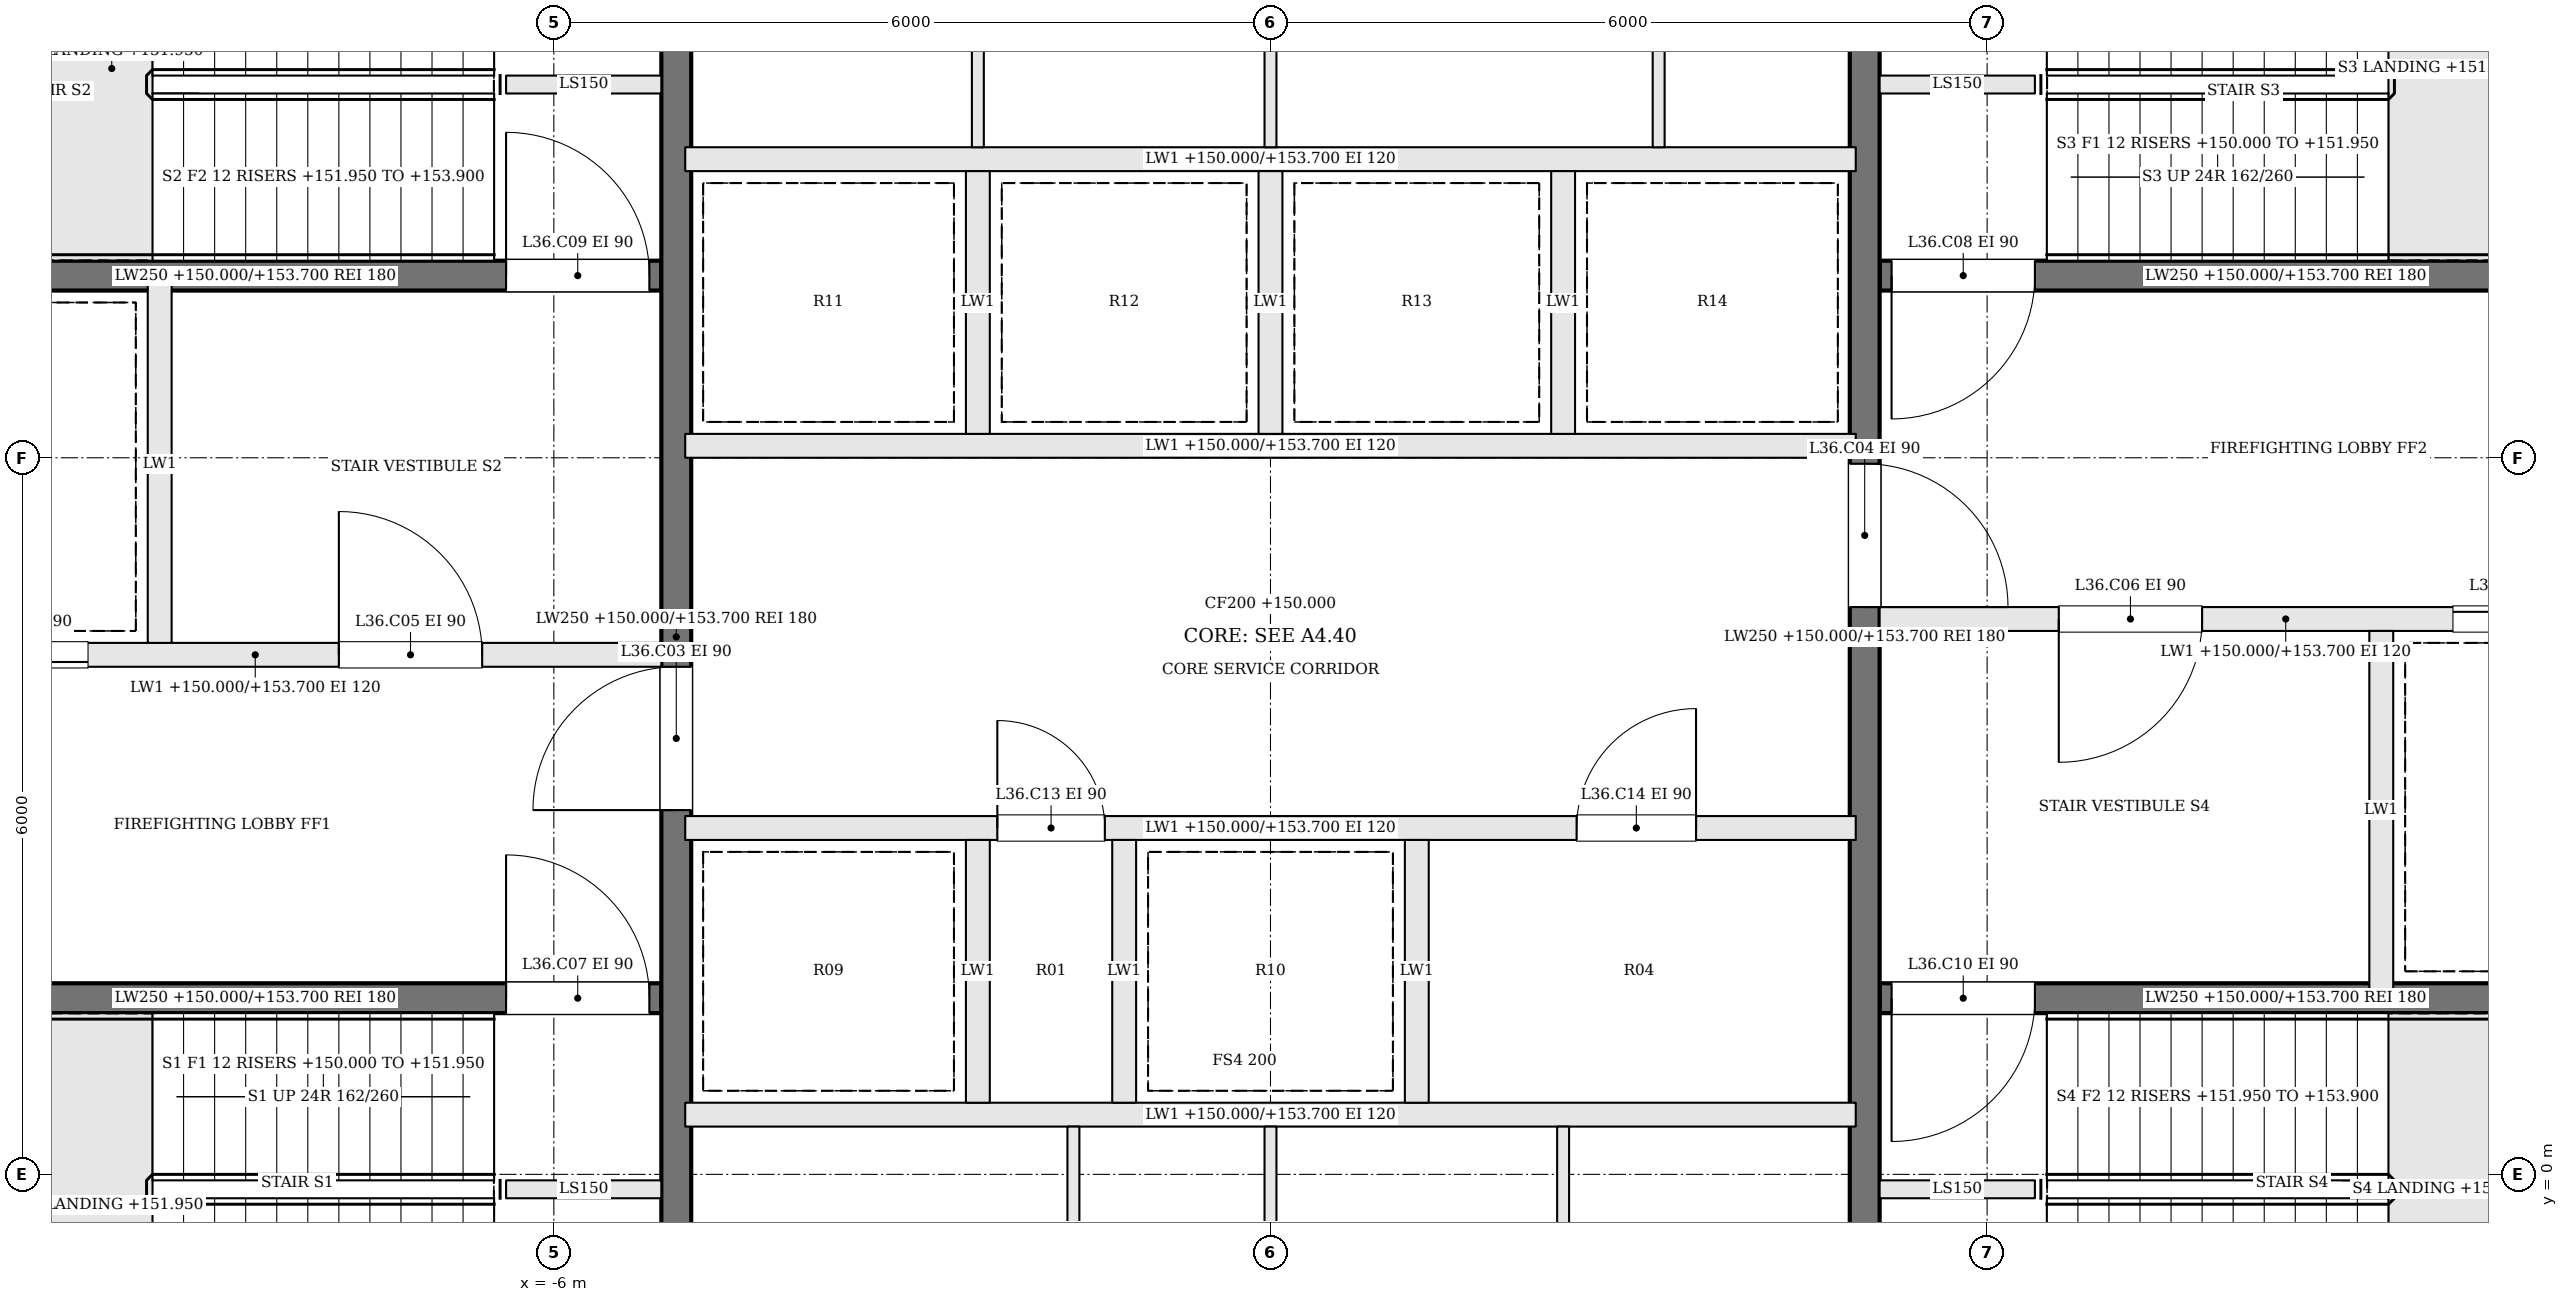
"""IFC4 building model, lengths in metres.
Left out: names, types, materials, properties, quantities, classifications, styles, units other than length and angle.
Written with IfcOpenShell. Run it as: python <this file> out.ifc"""

import sys

from ifc_helpers import new_model, si_unit, direction, frame, frame_2d, origin, place, context, subcontext, project, spatial, rectangle, extrude, element, fill, save


model = new_model("IFC4")
c1 = context("Model", 3, precision=1e-05, world=origin(), true_north=direction((0.0, 1.0)))
c2 = subcontext(c1, "Body", "Model", "MODEL_VIEW")
j1 = project(units=[si_unit("LENGTHUNIT", "METRE"), si_unit("PLANEANGLEUNIT", "RADIAN")], contexts=[c1])
p1 = place(None, origin())
s1 = spatial("IfcSite", under=j1, at=p1, CompositionType="ELEMENT")
p2 = place(p1, origin())
s2 = spatial("IfcBuilding", under=s1, at=p2, CompositionType="ELEMENT")
p3 = place(p2, frame((0.0, 0.0, 150.0)))
s3 = spatial("IfcBuildingStorey", under=s2, at=p3, CompositionType="ELEMENT", Elevation=150.0)
for number, where, z_axis, x_axis in (
    (1, (-6.4, -0.125, 0.0), (0.0, 0.0, 1.0), (1.0, 0.0, 0.0)),
    (2, (6.4, 9.125, 0.0), (0.0, 0.0, 1.0), (-1.0, 0.0, 0.0)),
    (3, (-6.4, 9.125, 0.0), (0.0, 0.0, 1.0), (1.0, 0.0, 0.0)),
    (4, (6.4, -0.125, 0.0), (0.0, 0.0, 1.0), (-1.0, 0.0, 0.0)),
):
    element("IfcWall", number, at=place(p3, frame(where, z_axis=z_axis, x_axis=x_axis)), inside=s3, PredefinedType="SOLIDWALL", context=c2, shape_type="SweptSolid", body=[
        extrude(rectangle(XDim=1.3, YDim=0.15, at=frame_2d((0.65, 0.0))), origin(), (0.0, 0.0, 1.0), 3.7),
    ])
p4 = place(p3, frame((-11.9, 1.475, 0.0), z_axis=(0.0, 0.0, 1.0), x_axis=(1.0, 0.0, 0.0)))
e5 = element("IfcWall", 5, at=p4, inside=s3, PredefinedType="SOLIDWALL", context=c2, shape_type="SweptSolid", body=[
    extrude(rectangle(XDim=6.8, YDim=0.25, at=frame_2d((3.4, 0.0))), origin(), (0.0, 0.0, 1.0), 3.7),
])
p5 = place(p4, frame((5.5, 0.0, 0.0)))
e6 = element("IfcOpeningElement", 6, at=p5, cuts=e5, PredefinedType="OPENING", context=c2, shape_type="SweptSolid", body=[
    extrude(rectangle(XDim=1.2, YDim=2.1, at=frame_2d((0.6, 1.05))), frame((0.0, 0.135, 0.0), z_axis=(0.0, -1.0, 0.0), x_axis=(1.0, 0.0, 0.0)), (0.0, 0.0, 1.0), 0.27),
])
p6 = place(p3, frame((11.9, 7.525, 0.0), z_axis=(0.0, 0.0, 1.0), x_axis=(-1.0, 0.0, 0.0)))
e7 = element("IfcWall", 7, at=p6, inside=s3, PredefinedType="SOLIDWALL", context=c2, shape_type="SweptSolid", body=[
    extrude(rectangle(XDim=6.8, YDim=0.25, at=frame_2d((3.4, 0.0))), origin(), (0.0, 0.0, 1.0), 3.7),
])
p7 = place(p6, frame((5.5, 0.0, 0.0)))
e8 = element("IfcOpeningElement", 8, at=p7, cuts=e7, PredefinedType="OPENING", context=c2, shape_type="SweptSolid", body=[
    extrude(rectangle(XDim=1.2, YDim=2.1, at=frame_2d((0.6, 1.05))), frame((0.0, 0.135, 0.0), z_axis=(0.0, -1.0, 0.0), x_axis=(1.0, 0.0, 0.0)), (0.0, 0.0, 1.0), 0.27),
])
p8 = place(p3, frame((-11.9, 4.35, 0.0), z_axis=(0.0, 0.0, 1.0), x_axis=(1.0, 0.0, 0.0)))
e9 = element("IfcWall", 9, at=p8, inside=s3, PredefinedType="SOLIDWALL", context=c2, shape_type="SweptSolid", body=[
    extrude(rectangle(XDim=6.8, YDim=0.2, at=frame_2d((3.4, 0.0))), origin(), (0.0, 0.0, 1.0), 3.7),
])
p9 = place(p8, frame((4.1, 0.0, 0.0)))
e10 = element("IfcOpeningElement", 10, at=p9, cuts=e9, PredefinedType="OPENING", context=c2, shape_type="SweptSolid", body=[
    extrude(rectangle(XDim=1.2, YDim=2.1, at=frame_2d((0.6, 1.05))), frame((0.0, 0.11, 0.0), z_axis=(0.0, -1.0, 0.0), x_axis=(1.0, 0.0, 0.0)), (0.0, 0.0, 1.0), 0.22),
])
p10 = place(p8, frame((0.8, 0.0, 0.0)))
e11 = element("IfcOpeningElement", 11, at=p10, cuts=e9, PredefinedType="OPENING", context=c2, shape_type="SweptSolid", body=[
    extrude(rectangle(XDim=1.2, YDim=2.1, at=frame_2d((0.6, 1.05))), frame((0.0, 0.11, 0.0), z_axis=(0.0, -1.0, 0.0), x_axis=(1.0, 0.0, 0.0)), (0.0, 0.0, 1.0), 0.22),
])
p11 = place(p3, frame((11.9, 4.65, 0.0), z_axis=(0.0, 0.0, 1.0), x_axis=(-1.0, 0.0, 0.0)))
e12 = element("IfcWall", 12, at=p11, inside=s3, PredefinedType="SOLIDWALL", context=c2, shape_type="SweptSolid", body=[
    extrude(rectangle(XDim=6.8, YDim=0.2, at=frame_2d((3.4, 0.0))), origin(), (0.0, 0.0, 1.0), 3.7),
])
p12 = place(p11, frame((4.1, 0.0, 0.0)))
e13 = element("IfcOpeningElement", 13, at=p12, cuts=e12, PredefinedType="OPENING", context=c2, shape_type="SweptSolid", body=[
    extrude(rectangle(XDim=1.2, YDim=2.1, at=frame_2d((0.6, 1.05))), frame((0.0, 0.11, 0.0), z_axis=(0.0, -1.0, 0.0), x_axis=(1.0, 0.0, 0.0)), (0.0, 0.0, 1.0), 0.22),
])
p13 = place(p11, frame((0.8, 0.0, 0.0)))
e14 = element("IfcOpeningElement", 14, at=p13, cuts=e12, PredefinedType="OPENING", context=c2, shape_type="SweptSolid", body=[
    extrude(rectangle(XDim=1.2, YDim=2.1, at=frame_2d((0.6, 1.05))), frame((0.0, 0.11, 0.0), z_axis=(0.0, -1.0, 0.0), x_axis=(1.0, 0.0, 0.0)), (0.0, 0.0, 1.0), 0.22),
])
p14 = place(p3, frame((-11.9, 7.525, 0.0), z_axis=(0.0, 0.0, 1.0), x_axis=(1.0, 0.0, 0.0)))
e15 = element("IfcWall", 15, at=p14, inside=s3, PredefinedType="SOLIDWALL", context=c2, shape_type="SweptSolid", body=[
    extrude(rectangle(XDim=6.8, YDim=0.25, at=frame_2d((3.4, 0.0))), origin(), (0.0, 0.0, 1.0), 3.7),
])
p15 = place(p14, frame((5.5, 0.0, 0.0)))
e16 = element("IfcOpeningElement", 16, at=p15, cuts=e15, PredefinedType="OPENING", context=c2, shape_type="SweptSolid", body=[
    extrude(rectangle(XDim=1.2, YDim=2.1, at=frame_2d((0.6, 1.05))), frame((0.0, 0.135, 0.0), z_axis=(0.0, -1.0, 0.0), x_axis=(1.0, 0.0, 0.0)), (0.0, 0.0, 1.0), 0.27),
])
p16 = place(p3, frame((11.9, 1.475, 0.0), z_axis=(0.0, 0.0, 1.0), x_axis=(-1.0, 0.0, 0.0)))
e17 = element("IfcWall", 17, at=p16, inside=s3, PredefinedType="SOLIDWALL", context=c2, shape_type="SweptSolid", body=[
    extrude(rectangle(XDim=6.8, YDim=0.25, at=frame_2d((3.4, 0.0))), origin(), (0.0, 0.0, 1.0), 3.7),
])
p17 = place(p16, frame((5.5, 0.0, 0.0)))
e18 = element("IfcOpeningElement", 18, at=p17, cuts=e17, PredefinedType="OPENING", context=c2, shape_type="SweptSolid", body=[
    extrude(rectangle(XDim=1.2, YDim=2.1, at=frame_2d((0.6, 1.05))), frame((0.0, 0.135, 0.0), z_axis=(0.0, -1.0, 0.0), x_axis=(1.0, 0.0, 0.0)), (0.0, 0.0, 1.0), 0.27),
])
for number, where, z_axis, x_axis in (
    (19, (-9.3, 4.45, 0.0), (0.0, 0.0, 1.0), (0.0, 1.0, 0.0)),
    (20, (9.3, 4.55, 0.0), (0.0, 0.0, 1.0), (0.0, -1.0, 0.0)),
):
    element("IfcWall", number, at=place(p3, frame(where, z_axis=z_axis, x_axis=x_axis)), inside=s3, PredefinedType="SOLIDWALL", context=c2, shape_type="SweptSolid", body=[
        extrude(rectangle(XDim=3.0, YDim=0.2, at=frame_2d((1.5, 0.0))), origin(), (0.0, 0.0, 1.0), 3.7),
    ])
p18 = place(p3, frame((-4.975, -1.9, 0.0), z_axis=(0.0, 0.0, 1.0), x_axis=(0.0, 1.0, 0.0)))
e21 = element("IfcWall", 21, at=p18, inside=s3, PredefinedType="SOLIDWALL", context=c2, shape_type="SweptSolid", body=[
    extrude(rectangle(XDim=12.8, YDim=0.25, at=frame_2d((6.4, 0.0))), origin(), (0.0, 0.0, 1.0), 3.7),
])
p19 = place(p18, frame((4.95, 0.0, 0.0)))
e22 = element("IfcOpeningElement", 22, at=p19, cuts=e21, PredefinedType="OPENING", context=c2, shape_type="SweptSolid", body=[
    extrude(rectangle(XDim=1.2, YDim=2.1, at=frame_2d((0.6, 1.05))), frame((0.0, 0.135, 0.0), z_axis=(0.0, -1.0, 0.0), x_axis=(1.0, 0.0, 0.0)), (0.0, 0.0, 1.0), 0.27),
])
p20 = place(p3, frame((4.975, 10.9, 0.0), z_axis=(0.0, 0.0, 1.0), x_axis=(0.0, -1.0, 0.0)))
e23 = element("IfcWall", 23, at=p20, inside=s3, PredefinedType="SOLIDWALL", context=c2, shape_type="SweptSolid", body=[
    extrude(rectangle(XDim=12.8, YDim=0.25, at=frame_2d((6.4, 0.0))), origin(), (0.0, 0.0, 1.0), 3.7),
])
p21 = place(p20, frame((4.95, 0.0, 0.0)))
e24 = element("IfcOpeningElement", 24, at=p21, cuts=e23, PredefinedType="OPENING", context=c2, shape_type="SweptSolid", body=[
    extrude(rectangle(XDim=1.2, YDim=2.1, at=frame_2d((0.6, 1.05))), frame((0.0, 0.135, 0.0), z_axis=(0.0, -1.0, 0.0), x_axis=(1.0, 0.0, 0.0)), (0.0, 0.0, 1.0), 0.27),
])
p22 = place(p3, frame((-4.9, 0.5, 0.0), z_axis=(0.0, 0.0, 1.0), x_axis=(1.0, 0.0, 0.0)))
e25 = element("IfcWall", 25, at=p22, inside=s3, PredefinedType="SOLIDWALL", context=c2, shape_type="SweptSolid", body=[
    extrude(rectangle(XDim=9.8, YDim=0.2, at=frame_2d((4.9, 0.0))), origin(), (0.0, 0.0, 1.0), 3.7),
])
p23 = place(p3, frame((-4.9, 2.9, 0.0), z_axis=(0.0, 0.0, 1.0), x_axis=(1.0, 0.0, 0.0)))
e26 = element("IfcWall", 26, at=p23, inside=s3, PredefinedType="SOLIDWALL", context=c2, shape_type="SweptSolid", body=[
    extrude(rectangle(XDim=9.8, YDim=0.2, at=frame_2d((4.9, 0.0))), origin(), (0.0, 0.0, 1.0), 3.7),
])
p24 = place(p23, frame((2.613, 0.0, 0.0)))
e27 = element("IfcOpeningElement", 27, at=p24, cuts=e26, PredefinedType="OPENING", context=c2, shape_type="SweptSolid", body=[
    extrude(rectangle(XDim=0.9, YDim=2.1, at=frame_2d((0.45, 1.05))), frame((0.0, 0.11, 0.0), z_axis=(0.0, -1.0, 0.0), x_axis=(1.0, 0.0, 0.0)), (0.0, 0.0, 1.0), 0.22),
])
p25 = place(p23, frame((7.463, 0.0, 0.0)))
e28 = element("IfcOpeningElement", 28, at=p25, cuts=e26, PredefinedType="OPENING", context=c2, shape_type="SweptSolid", body=[
    extrude(rectangle(XDim=1.0, YDim=2.1, at=frame_2d((0.5, 1.05))), frame((0.0, 0.11, 0.0), z_axis=(0.0, -1.0, 0.0), x_axis=(1.0, 0.0, 0.0)), (0.0, 0.0, 1.0), 0.22),
])
for number, where, z_axis, x_axis in (
    (29, (-4.9, 6.1, 0.0), (0.0, 0.0, 1.0), (1.0, 0.0, 0.0)),
    (30, (-4.9, 8.5, 0.0), (0.0, 0.0, 1.0), (1.0, 0.0, 0.0)),
):
    element("IfcWall", number, at=place(p3, frame(where, z_axis=z_axis, x_axis=x_axis)), inside=s3, PredefinedType="SOLIDWALL", context=c2, shape_type="SweptSolid", body=[
        extrude(rectangle(XDim=9.8, YDim=0.2, at=frame_2d((4.9, 0.0))), origin(), (0.0, 0.0, 1.0), 3.7),
    ])
for number, where, z_axis, x_axis in (
    (31, (-2.45, 0.6, 0.0), (0.0, 0.0, 1.0), (0.0, 1.0, 0.0)),
    (32, (-1.225, 0.6, 0.0), (0.0, 0.0, 1.0), (0.0, 1.0, 0.0)),
    (33, (1.225, 0.6, 0.0), (0.0, 0.0, 1.0), (0.0, 1.0, 0.0)),
    (34, (-2.45, 6.2, 0.0), (0.0, 0.0, 1.0), (0.0, 1.0, 0.0)),
    (35, (0.0, 6.2, 0.0), (0.0, 0.0, 1.0), (0.0, 1.0, 0.0)),
    (36, (2.45, 6.2, 0.0), (0.0, 0.0, 1.0), (0.0, 1.0, 0.0)),
):
    element("IfcWall", number, at=place(p3, frame(where, z_axis=z_axis, x_axis=x_axis)), inside=s3, PredefinedType="SOLIDWALL", context=c2, shape_type="SweptSolid", body=[
        extrude(rectangle(XDim=2.2, YDim=0.2, at=frame_2d((1.1, 0.0))), origin(), (0.0, 0.0, 1.0), 3.7),
    ])
for number, where, z_axis, x_axis in (
    (37, (-1.65, -1.9, 0.0), (0.0, 0.0, 1.0), (0.0, 1.0, 0.0)),
    (38, (0.0, -1.9, 0.0), (0.0, 0.0, 1.0), (0.0, 1.0, 0.0)),
    (39, (2.45, -1.9, 0.0), (0.0, 0.0, 1.0), (0.0, 1.0, 0.0)),
    (40, (-2.45, 8.6, 0.0), (0.0, 0.0, 1.0), (0.0, 1.0, 0.0)),
    (41, (0.0, 8.6, 0.0), (0.0, 0.0, 1.0), (0.0, 1.0, 0.0)),
    (42, (3.25, 8.6, 0.0), (0.0, 0.0, 1.0), (0.0, 1.0, 0.0)),
):
    element("IfcWall", number, at=place(p3, frame(where, z_axis=z_axis, x_axis=x_axis)), inside=s3, PredefinedType="PARTITIONING", context=c2, shape_type="SweptSolid", body=[
        extrude(rectangle(XDim=2.3, YDim=0.1, at=frame_2d((1.15, 0.0))), origin(), (0.0, 0.0, 1.0), 3.7),
    ])
p26 = place(p19, origin())
e43 = element("IfcDoor", 43, at=p26, inside=s3, OperationType="SINGLE_SWING_LEFT", PredefinedType="DOOR", context=c2, shape_type="SweptSolid", body=[
    extrude(rectangle(XDim=1.2, YDim=2.1, at=frame_2d((0.6, 1.05))), frame((0.0, 0.025, 0.0), z_axis=(0.0, -1.0, 0.0), x_axis=(1.0, 0.0, 0.0)), (0.0, 0.0, 1.0), 0.05),
])
fill(e22, e43)
p27 = place(p21, origin())
e44 = element("IfcDoor", 44, at=p27, inside=s3, OperationType="SINGLE_SWING_RIGHT", PredefinedType="DOOR", context=c2, shape_type="SweptSolid", body=[
    extrude(rectangle(XDim=1.2, YDim=2.1, at=frame_2d((0.6, 1.05))), frame((0.0, 0.025, 0.0), z_axis=(0.0, -1.0, 0.0), x_axis=(1.0, 0.0, 0.0)), (0.0, 0.0, 1.0), 0.05),
])
fill(e24, e44)
p28 = place(p9, origin())
e45 = element("IfcDoor", 45, at=p28, inside=s3, OperationType="SINGLE_SWING_LEFT", PredefinedType="DOOR", context=c2, shape_type="SweptSolid", body=[
    extrude(rectangle(XDim=1.2, YDim=2.1, at=frame_2d((0.6, 1.05))), frame((0.0, 0.025, 0.0), z_axis=(0.0, -1.0, 0.0), x_axis=(1.0, 0.0, 0.0)), (0.0, 0.0, 1.0), 0.05),
])
fill(e10, e45)
p29 = place(p12, origin())
e46 = element("IfcDoor", 46, at=p29, inside=s3, OperationType="SINGLE_SWING_RIGHT", PredefinedType="DOOR", context=c2, shape_type="SweptSolid", body=[
    extrude(rectangle(XDim=1.2, YDim=2.1, at=frame_2d((0.6, 1.05))), frame((0.0, 0.025, 0.0), z_axis=(0.0, -1.0, 0.0), x_axis=(1.0, 0.0, 0.0)), (0.0, 0.0, 1.0), 0.05),
])
fill(e13, e46)
p30 = place(p5, origin())
e47 = element("IfcDoor", 47, at=p30, inside=s3, OperationType="SINGLE_SWING_LEFT", PredefinedType="DOOR", context=c2, shape_type="SweptSolid", body=[
    extrude(rectangle(XDim=1.2, YDim=2.1, at=frame_2d((0.6, 1.05))), frame((0.0, 0.025, 0.0), z_axis=(0.0, -1.0, 0.0), x_axis=(1.0, 0.0, 0.0)), (0.0, 0.0, 1.0), 0.05),
])
fill(e6, e47)
p31 = place(p7, origin())
e48 = element("IfcDoor", 48, at=p31, inside=s3, OperationType="SINGLE_SWING_RIGHT", PredefinedType="DOOR", context=c2, shape_type="SweptSolid", body=[
    extrude(rectangle(XDim=1.2, YDim=2.1, at=frame_2d((0.6, 1.05))), frame((0.0, 0.025, 0.0), z_axis=(0.0, -1.0, 0.0), x_axis=(1.0, 0.0, 0.0)), (0.0, 0.0, 1.0), 0.05),
])
fill(e8, e48)
p32 = place(p15, origin())
e49 = element("IfcDoor", 49, at=p32, inside=s3, OperationType="SINGLE_SWING_LEFT", PredefinedType="DOOR", context=c2, shape_type="SweptSolid", body=[
    extrude(rectangle(XDim=1.2, YDim=2.1, at=frame_2d((0.6, 1.05))), frame((0.0, 0.025, 0.0), z_axis=(0.0, -1.0, 0.0), x_axis=(1.0, 0.0, 0.0)), (0.0, 0.0, 1.0), 0.05),
])
fill(e16, e49)
p33 = place(p17, origin())
e50 = element("IfcDoor", 50, at=p33, inside=s3, OperationType="SINGLE_SWING_RIGHT", PredefinedType="DOOR", context=c2, shape_type="SweptSolid", body=[
    extrude(rectangle(XDim=1.2, YDim=2.1, at=frame_2d((0.6, 1.05))), frame((0.0, 0.025, 0.0), z_axis=(0.0, -1.0, 0.0), x_axis=(1.0, 0.0, 0.0)), (0.0, 0.0, 1.0), 0.05),
])
fill(e18, e50)
p34 = place(p10, origin())
e51 = element("IfcDoor", 51, at=p34, inside=s3, OperationType="SLIDING_TO_RIGHT", PredefinedType="DOOR", context=c2, shape_type="SweptSolid", body=[
    extrude(rectangle(XDim=1.2, YDim=2.1, at=frame_2d((0.6, 1.05))), frame((0.0, 0.025, 0.0), z_axis=(0.0, -1.0, 0.0), x_axis=(1.0, 0.0, 0.0)), (0.0, 0.0, 1.0), 0.05),
])
fill(e11, e51)
p35 = place(p13, origin())
e52 = element("IfcDoor", 52, at=p35, inside=s3, OperationType="SLIDING_TO_RIGHT", PredefinedType="DOOR", context=c2, shape_type="SweptSolid", body=[
    extrude(rectangle(XDim=1.2, YDim=2.1, at=frame_2d((0.6, 1.05))), frame((0.0, 0.025, 0.0), z_axis=(0.0, -1.0, 0.0), x_axis=(1.0, 0.0, 0.0)), (0.0, 0.0, 1.0), 0.05),
])
fill(e14, e52)
p36 = place(p24, origin())
e53 = element("IfcDoor", 53, at=p36, inside=s3, OperationType="SINGLE_SWING_LEFT", PredefinedType="DOOR", context=c2, shape_type="SweptSolid", body=[
    extrude(rectangle(XDim=0.9, YDim=2.1, at=frame_2d((0.45, 1.05))), frame((0.0, 0.025, 0.0), z_axis=(0.0, -1.0, 0.0), x_axis=(1.0, 0.0, 0.0)), (0.0, 0.0, 1.0), 0.05),
])
fill(e27, e53)
p37 = place(p25, origin())
e54 = element("IfcDoor", 54, at=p37, inside=s3, OperationType="SINGLE_SWING_RIGHT", PredefinedType="DOOR", context=c2, shape_type="SweptSolid", body=[
    extrude(rectangle(XDim=1.0, YDim=2.1, at=frame_2d((0.5, 1.05))), frame((0.0, 0.025, 0.0), z_axis=(0.0, -1.0, 0.0), x_axis=(1.0, 0.0, 0.0)), (0.0, 0.0, 1.0), 0.05),
])
fill(e28, e54)
save(model, sys.argv[1])
